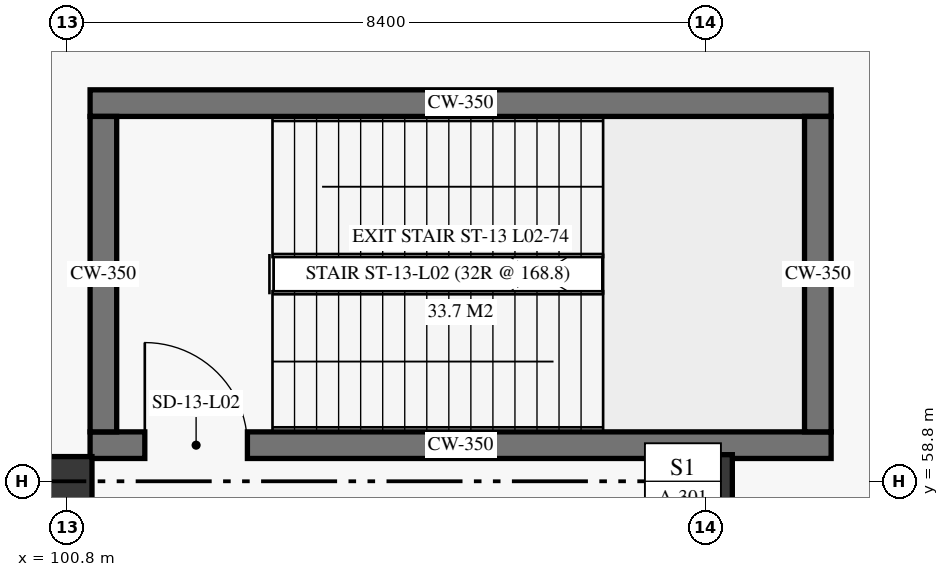
"""IFC4 building model, lengths in metres.
Left out: names, types, materials, properties, quantities, classifications, styles, units other than length and angle.
Written with IfcOpenShell. Run it as: python <this file> out.ifc"""

import sys

from ifc_helpers import new_model, si_unit, direction, frame, frame_2d, origin, origin_2d, place, context, subcontext, project, spatial, rectangle, extrude, element, fill, save


model = new_model("IFC4")
c1 = context("Model", 3, precision=1e-05, world=origin(), true_north=direction((0.0, 1.0)))
c2 = subcontext(c1, "Body", "Model", "MODEL_VIEW")
j1 = project(units=[si_unit("LENGTHUNIT", "METRE"), si_unit("PLANEANGLEUNIT", "RADIAN")], contexts=[c1])
p1 = place(None, origin())
s1 = spatial("IfcSite", under=j1, at=p1, CompositionType="ELEMENT")
p2 = place(p1, origin())
s2 = spatial("IfcBuilding", under=s1, at=p2, CompositionType="ELEMENT")
p3 = place(p2, frame((0.0, 0.0, 6.0)))
s3 = spatial("IfcBuildingStorey", under=s2, at=p3, CompositionType="ELEMENT", Elevation=6.0)
p4 = place(p3, frame((100.8, 58.8, 0.0), z_axis=(0.0, 0.0, 1.0), x_axis=(1.0, 0.0, 0.0)))
e1 = element("IfcColumn", 1, at=p4, inside=s3, PredefinedType="COLUMN", context=c2, shape_type="SweptSolid", body=[
    extrude(rectangle(XDim=0.65, YDim=0.65, at=origin_2d()), origin(), (0.0, 0.0, 1.0), 5.1),
])
p5 = place(p3, frame((109.2, 58.8, 0.0), z_axis=(0.0, 0.0, 1.0), x_axis=(1.0, 0.0, 0.0)))
e2 = element("IfcColumn", 2, at=p5, inside=s3, PredefinedType="COLUMN", context=c2, shape_type="SweptSolid", body=[
    extrude(rectangle(XDim=0.7, YDim=0.7, at=origin_2d()), origin(), (0.0, 0.0, 1.0), 5.1),
])
p6 = place(p3, frame((101.1, 59.275, 0.0), z_axis=(0.0, 0.0, 1.0), x_axis=(1.0, 0.0, 0.0)))
e3 = element("IfcWall", 3, at=p6, inside=s3, PredefinedType="SHEAR", context=c2, shape_type="SweptSolid", body=[
    extrude(rectangle(XDim=9.75, YDim=0.35, at=frame_2d((4.875, 0.0))), origin(), (0.0, 0.0, 1.0), 5.1),
])
p7 = place(p6, frame((0.72, 0.0, 0.0)))
e4 = element("IfcOpeningElement", 4, at=p7, cuts=e3, PredefinedType="OPENING", context=c2, shape_type="SweptSolid", body=[
    extrude(rectangle(XDim=1.35, YDim=2.25, at=frame_2d((0.675, 1.125))), frame((0.0, 0.185, 0.0), z_axis=(0.0, -1.0, 0.0), x_axis=(1.0, 0.0, 0.0)), (0.0, 0.0, 1.0), 0.37),
])
p8 = place(p3, frame((101.1, 63.775, 0.0), z_axis=(0.0, 0.0, 1.0), x_axis=(1.0, 0.0, 0.0)))
e5 = element("IfcWall", 5, at=p8, inside=s3, PredefinedType="SHEAR", context=c2, shape_type="SweptSolid", body=[
    extrude(rectangle(XDim=9.75, YDim=0.35, at=frame_2d((4.875, 0.0))), origin(), (0.0, 0.0, 1.0), 5.1),
])
for number, where, z_axis, x_axis in (
    (6, (101.275, 59.45, 0.0), (0.0, 0.0, 1.0), (0.0, 1.0, 0.0)),
    (7, (110.675, 59.45, 0.0), (0.0, 0.0, 1.0), (0.0, 1.0, 0.0)),
):
    element("IfcWall", number, at=place(p3, frame(where, z_axis=z_axis, x_axis=x_axis)), inside=s3, PredefinedType="SHEAR", context=c2, shape_type="SweptSolid", body=[
        extrude(rectangle(XDim=4.15, YDim=0.35, at=frame_2d((2.075, 0.0))), origin(), (0.0, 0.0, 1.0), 5.1),
    ])
p9 = place(p7, origin())
e8 = element("IfcDoor", 8, at=p9, inside=s3, OperationType="SINGLE_SWING_LEFT", PredefinedType="DOOR", context=c2, shape_type="SweptSolid", body=[
    extrude(rectangle(XDim=1.35, YDim=2.25, at=frame_2d((0.675, 1.125))), frame((0.0, 0.025, 0.0), z_axis=(0.0, -1.0, 0.0), x_axis=(1.0, 0.0, 0.0)), (0.0, 0.0, 1.0), 0.05),
])
fill(e4, e8)
save(model, sys.argv[1])
